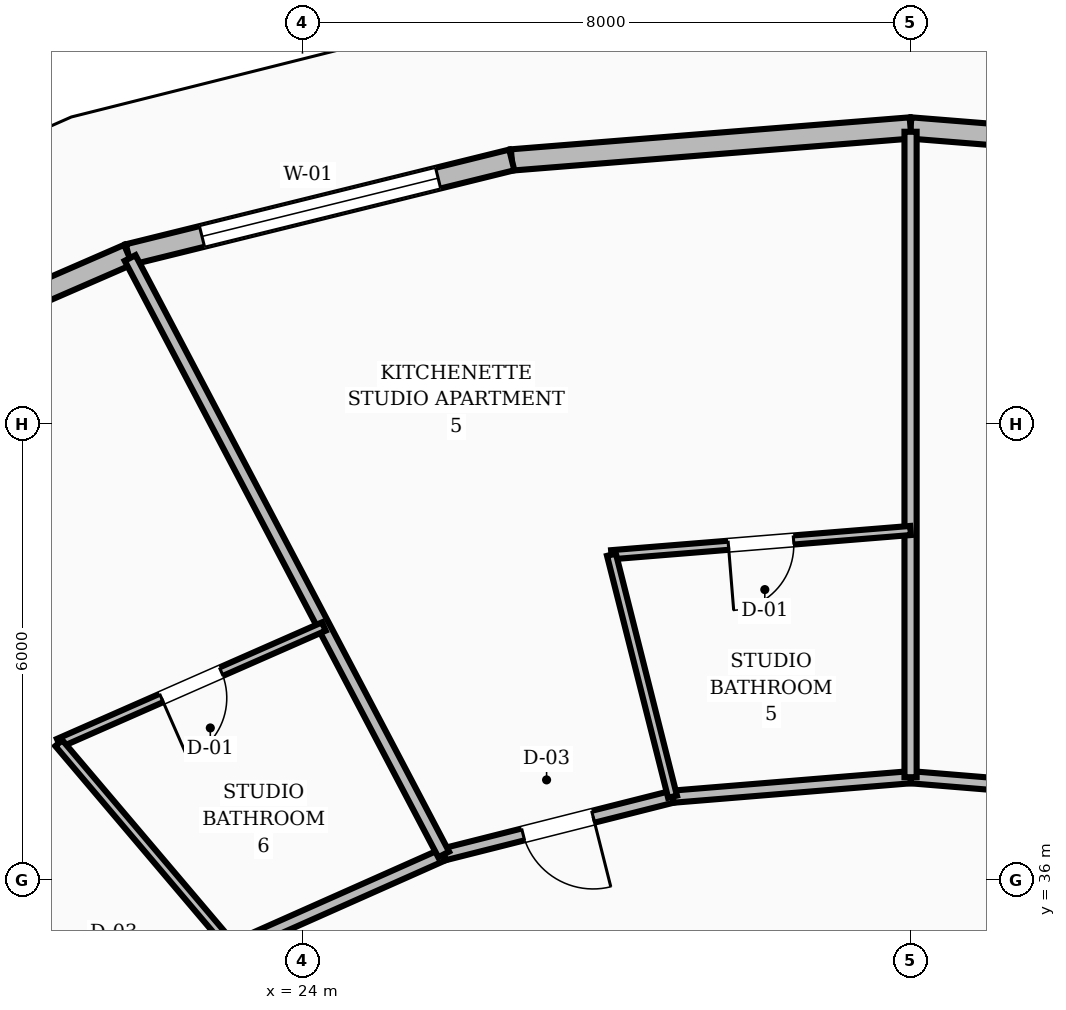
"""IFC4 building model, lengths in metres.
Left out: names, types, materials, properties, quantities, classifications, styles, units other than length and angle.
Written with IfcOpenShell. Run it as: python <this file> out.ifc"""

import sys

from ifc_helpers import new_model, si_unit, direction, frame, frame_2d, origin, place, context, subcontext, project, spatial, rectangle, extrude, element, fill, save


model = new_model("IFC4")
c1 = context("Model", 3, precision=1e-05, world=origin(), true_north=direction((0.0, 1.0)))
c2 = subcontext(c1, "Body", "Model", "MODEL_VIEW")
j1 = project(units=[si_unit("LENGTHUNIT", "METRE"), si_unit("PLANEANGLEUNIT", "RADIAN")], contexts=[c1])
p1 = place(None, origin())
s1 = spatial("IfcSite", under=j1, at=p1, CompositionType="ELEMENT")
p2 = place(p1, origin())
s2 = spatial("IfcBuilding", under=s1, at=p2, CompositionType="ELEMENT")
p3 = place(p2, frame((0.0, 0.0, 66.4)))
s3 = spatial("IfcBuildingStorey", under=s2, at=p3, CompositionType="ELEMENT", Elevation=66.4)
p4 = place(p3, frame((37.246, 45.471, 0.0), z_axis=(0.0, 0.0, 1.0), x_axis=(-0.996800955667, 0.079924056336, 0.0)))
e1 = element("IfcWall", 1, at=p4, inside=s3, PredefinedType="STANDARD", context=c2, shape_type="SweptSolid", body=[
    extrude(rectangle(XDim=5.263, YDim=0.28, at=frame_2d((2.632, 0.0))), origin(), (0.0, 0.0, 1.0), 2.71),
])
p5 = place(p4, frame((1.031, 0.0, 0.8)))
e2 = element("IfcOpeningElement", 2, at=p5, cuts=e1, PredefinedType="OPENING", context=c2, shape_type="SweptSolid", body=[
    extrude(rectangle(XDim=3.2, YDim=1.65, at=frame_2d((1.6, 0.825))), frame((0.0, 0.15, 0.0), z_axis=(0.0, -1.0, 0.0), x_axis=(1.0, 0.0, 0.0)), (0.0, 0.0, 1.0), 0.3),
])
p6 = place(p3, frame((32.0, 45.892, 0.0), z_axis=(0.0, 0.0, 1.0), x_axis=(-0.996800955667, -0.079924056336, 0.0)))
e3 = element("IfcWall", 3, at=p6, inside=s3, PredefinedType="STANDARD", context=c2, shape_type="SweptSolid", body=[
    extrude(rectangle(XDim=5.263, YDim=0.28, at=frame_2d((2.632, 0.0))), origin(), (0.0, 0.0, 1.0), 2.71),
])
p7 = place(p3, frame((26.754, 45.471, 0.0), z_axis=(0.0, 0.0, 1.0), x_axis=(-0.970832238087, -0.239759807915, 0.0)))
e4 = element("IfcWall", 4, at=p7, inside=s3, PredefinedType="STANDARD", context=c2, shape_type="SweptSolid", body=[
    extrude(rectangle(XDim=5.196, YDim=0.28, at=frame_2d((2.598, 0.0))), origin(), (0.0, 0.0, 1.0), 2.71),
])
p8 = place(p7, frame((0.998, 0.0, 0.8)))
e5 = element("IfcOpeningElement", 5, at=p8, cuts=e4, PredefinedType="OPENING", context=c2, shape_type="SweptSolid", body=[
    extrude(rectangle(XDim=3.2, YDim=1.65, at=frame_2d((1.6, 0.825))), frame((0.0, 0.15, 0.0), z_axis=(0.0, -1.0, 0.0), x_axis=(1.0, 0.0, 0.0)), (0.0, 0.0, 1.0), 0.3),
])
p9 = place(p3, frame((21.709, 44.225, 0.0), z_axis=(0.0, 0.0, 1.0), x_axis=(-0.916956720631, -0.398986682096, 0.0)))
e6 = element("IfcWall", 6, at=p9, inside=s3, PredefinedType="STANDARD", context=c2, shape_type="SweptSolid", body=[
    extrude(rectangle(XDim=5.07, YDim=0.28, at=frame_2d((2.535, 0.0))), origin(), (0.0, 0.0, 1.0), 2.71),
])
p10 = place(p3, frame((35.131, 37.094, 0.0), z_axis=(0.0, 0.0, 1.0), x_axis=(-0.996658973252, 0.081675522876, 0.0)))
e7 = element("IfcWall", 7, at=p10, inside=s3, PredefinedType="SOLIDWALL", context=c2, shape_type="SweptSolid", body=[
    extrude(rectangle(XDim=3.142, YDim=0.16, at=frame_2d((1.571, 0.0))), origin(), (0.0, 0.0, 1.0), 2.71),
])
p11 = place(p10, frame((1.096, 0.0, 0.0)))
e8 = element("IfcOpeningElement", 8, at=p11, cuts=e7, PredefinedType="OPENING", context=c2, shape_type="SweptSolid", body=[
    extrude(rectangle(XDim=0.95, YDim=2.1, at=frame_2d((0.475, 1.05))), frame((0.0, 0.09, 0.0), z_axis=(0.0, -1.0, 0.0), x_axis=(1.0, 0.0, 0.0)), (0.0, 0.0, 1.0), 0.18),
])
p12 = place(p3, frame((32.0, 37.35, 0.0), z_axis=(0.0, 0.0, 1.0), x_axis=(-0.996658973252, -0.081675522876, 0.0)))
e9 = element("IfcWall", 9, at=p12, inside=s3, PredefinedType="SOLIDWALL", context=c2, shape_type="SweptSolid", body=[
    extrude(rectangle(XDim=3.142, YDim=0.16, at=frame_2d((1.571, 0.0))), origin(), (0.0, 0.0, 1.0), 2.71),
])
p13 = place(p3, frame((28.869, 37.094, 0.0), z_axis=(0.0, 0.0, 1.0), x_axis=(-0.969608333194, -0.244662380029, 0.0)))
e10 = element("IfcWall", 10, at=p13, inside=s3, PredefinedType="SOLIDWALL", context=c2, shape_type="SweptSolid", body=[
    extrude(rectangle(XDim=3.105, YDim=0.16, at=frame_2d((1.553, 0.0))), origin(), (0.0, 0.0, 1.0), 2.71),
])
p14 = place(p13, frame((1.078, 0.0, 0.0)))
e11 = element("IfcOpeningElement", 11, at=p14, cuts=e10, PredefinedType="OPENING", context=c2, shape_type="SweptSolid", body=[
    extrude(rectangle(XDim=0.95, YDim=2.1, at=frame_2d((0.475, 1.05))), frame((0.0, 0.09, 0.0), z_axis=(0.0, -1.0, 0.0), x_axis=(1.0, 0.0, 0.0)), (0.0, 0.0, 1.0), 0.18),
])
p15 = place(p3, frame((25.858, 36.334, 0.0), z_axis=(0.0, 0.0, 1.0), x_axis=(-0.913768445178, -0.406235434936, 0.0)))
e12 = element("IfcWall", 12, at=p15, inside=s3, PredefinedType="SOLIDWALL", context=c2, shape_type="SweptSolid", body=[
    extrude(rectangle(XDim=3.037, YDim=0.16, at=frame_2d((1.519, 0.0))), origin(), (0.0, 0.0, 1.0), 2.71),
])
p16 = place(p3, frame((32.0, 37.35, 0.0), z_axis=(0.0, 0.0, 1.0), x_axis=(0.0, 1.0, 0.0)))
e13 = element("IfcWall", 13, at=p16, inside=s3, PredefinedType="SOLIDWALL", context=c2, shape_type="SweptSolid", body=[
    extrude(rectangle(XDim=8.491, YDim=0.16, at=frame_2d((4.246, 0.0))), origin(), (0.0, 0.0, 1.0), 2.71),
])
p17 = place(p3, frame((32.0, 40.596, 0.0), z_axis=(0.0, 0.0, 1.0), x_axis=(-0.996732951444, -0.080767713258, 0.0)))
e14 = element("IfcWall", 14, at=p17, inside=s3, PredefinedType="PARTITIONING", context=c2, shape_type="SweptSolid", body=[
    extrude(rectangle(XDim=3.948, YDim=0.12, at=frame_2d((1.974, 0.0))), origin(), (0.0, 0.0, 1.0), 2.71),
])
p18 = place(p17, frame((1.544, 0.0, 0.0)))
e15 = element("IfcOpeningElement", 15, at=p18, cuts=e14, PredefinedType="OPENING", context=c2, shape_type="SweptSolid", body=[
    extrude(rectangle(XDim=0.86, YDim=2.1, at=frame_2d((0.43, 1.05))), frame((0.0, 0.07, 0.0), z_axis=(0.0, -1.0, 0.0), x_axis=(1.0, 0.0, 0.0)), (0.0, 0.0, 1.0), 0.14),
])
p19 = place(p3, frame((28.869, 37.094, 0.0), z_axis=(0.0, 0.0, 1.0), x_axis=(-0.24479200307, 0.969575616047, 0.0)))
e16 = element("IfcWall", 16, at=p19, inside=s3, PredefinedType="PARTITIONING", context=c2, shape_type="SweptSolid", body=[
    extrude(rectangle(XDim=3.283, YDim=0.12, at=frame_2d((1.642, 0.0))), origin(), (0.0, 0.0, 1.0), 2.71),
])
p20 = place(p3, frame((25.858, 36.334, 0.0), z_axis=(0.0, 0.0, 1.0), x_axis=(-0.465340061266, 0.885131983029, 0.0)))
e17 = element("IfcWall", 17, at=p20, inside=s3, PredefinedType="SOLIDWALL", context=c2, shape_type="SweptSolid", body=[
    extrude(rectangle(XDim=8.865, YDim=0.16, at=frame_2d((4.433, 0.0))), origin(), (0.0, 0.0, 1.0), 2.71),
])
p21 = place(p3, frame((24.281, 39.333, 0.0), z_axis=(0.0, 0.0, 1.0), x_axis=(-0.915384944757, -0.40257968517, 0.0)))
e18 = element("IfcWall", 18, at=p21, inside=s3, PredefinedType="PARTITIONING", context=c2, shape_type="SweptSolid", body=[
    extrude(rectangle(XDim=3.81, YDim=0.12, at=frame_2d((1.905, 0.0))), origin(), (0.0, 0.0, 1.0), 2.71),
])
p22 = place(p21, frame((1.475, 0.0, 0.0)))
e19 = element("IfcOpeningElement", 19, at=p22, cuts=e18, PredefinedType="OPENING", context=c2, shape_type="SweptSolid", body=[
    extrude(rectangle(XDim=0.86, YDim=2.1, at=frame_2d((0.43, 1.05))), frame((0.0, 0.07, 0.0), z_axis=(0.0, -1.0, 0.0), x_axis=(1.0, 0.0, 0.0)), (0.0, 0.0, 1.0), 0.14),
])
p23 = place(p3, frame((23.083, 35.1, 0.0), z_axis=(0.0, 0.0, 1.0), x_axis=(-0.646810898815, 0.76265041872, 0.0)))
e20 = element("IfcWall", 20, at=p23, inside=s3, PredefinedType="PARTITIONING", context=c2, shape_type="SweptSolid", body=[
    extrude(rectangle(XDim=3.539, YDim=0.12, at=frame_2d((1.769, 0.0))), origin(), (0.0, 0.0, 1.0), 2.71),
])
p24 = place(p8, origin())
e21 = element("IfcWindow", 21, at=p24, inside=s3, PartitioningType="SINGLE_PANEL", PredefinedType="WINDOW", context=c2, shape_type="SweptSolid", body=[
    extrude(rectangle(XDim=3.2, YDim=1.65, at=frame_2d((1.6, 0.825))), frame((0.0, 0.03, 0.0), z_axis=(0.0, -1.0, 0.0), x_axis=(1.0, 0.0, 0.0)), (0.0, 0.0, 1.0), 0.06),
])
fill(e5, e21)
p25 = place(p18, origin())
e22 = element("IfcDoor", 22, at=p25, inside=s3, OperationType="SINGLE_SWING_RIGHT", PredefinedType="DOOR", context=c2, shape_type="SweptSolid", body=[
    extrude(rectangle(XDim=0.86, YDim=2.1, at=frame_2d((0.43, 1.05))), frame((0.0, 0.025, 0.0), z_axis=(0.0, -1.0, 0.0), x_axis=(1.0, 0.0, 0.0)), (0.0, 0.0, 1.0), 0.05),
])
fill(e15, e22)
p26 = place(p14, origin())
e23 = element("IfcDoor", 23, at=p26, inside=s3, OperationType="SINGLE_SWING_LEFT", PredefinedType="DOOR", context=c2, shape_type="SweptSolid", body=[
    extrude(rectangle(XDim=0.95, YDim=2.1, at=frame_2d((0.475, 1.05))), frame((0.0, 0.025, 0.0), z_axis=(0.0, -1.0, 0.0), x_axis=(1.0, 0.0, 0.0)), (0.0, 0.0, 1.0), 0.05),
])
fill(e11, e23)
p27 = place(p22, origin())
e24 = element("IfcDoor", 24, at=p27, inside=s3, OperationType="SINGLE_SWING_RIGHT", PredefinedType="DOOR", context=c2, shape_type="SweptSolid", body=[
    extrude(rectangle(XDim=0.86, YDim=2.1, at=frame_2d((0.43, 1.05))), frame((0.0, 0.025, 0.0), z_axis=(0.0, -1.0, 0.0), x_axis=(1.0, 0.0, 0.0)), (0.0, 0.0, 1.0), 0.05),
])
fill(e19, e24)
save(model, sys.argv[1])
